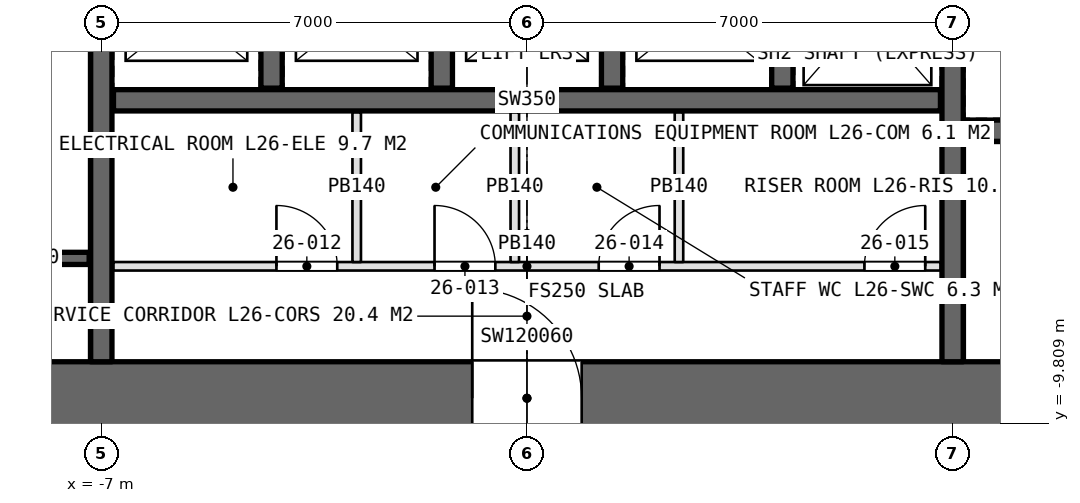
"""IFC4 building model, lengths in metres.
Left out: names, types, materials, properties, quantities, classifications, styles, units other than length and angle.
Written with IfcOpenShell. Run it as: python <this file> out.ifc"""

import sys

from ifc_helpers import new_model, si_unit, direction, frame, frame_2d, origin, place, context, subcontext, project, spatial, rectangle, extrude, element, fill, save


model = new_model("IFC4")
c1 = context("Model", 3, precision=1e-05, world=origin(), true_north=direction((0.0, 1.0)))
c2 = subcontext(c1, "Body", "Model", "MODEL_VIEW")
j1 = project(units=[si_unit("LENGTHUNIT", "METRE"), si_unit("PLANEANGLEUNIT", "RADIAN")], contexts=[c1])
p1 = place(None, origin())
s1 = spatial("IfcSite", under=j1, at=p1, CompositionType="ELEMENT")
p2 = place(p1, origin())
s2 = spatial("IfcBuilding", under=s1, at=p2, CompositionType="ELEMENT")
p3 = place(p2, frame((0.0, 0.0, 126.0)))
s3 = spatial("IfcBuildingStorey", under=s2, at=p3, CompositionType="ELEMENT", Elevation=126.0)
p4 = place(p3, frame((-14.0, -9.4, 0.0), z_axis=(0.0, 0.0, 1.0), x_axis=(1.0, 0.0, 0.0)))
e1 = element("IfcWall", 1, at=p4, inside=s3, PredefinedType="SHEAR", context=c2, shape_type="SweptSolid", body=[
    extrude(rectangle(XDim=28.0, YDim=1.2, at=frame_2d((14.0, 0.0))), origin(), (0.0, 0.0, 1.0), 4.2),
])
p5 = place(p4, frame((13.1, 0.0, 0.0)))
e2 = element("IfcOpeningElement", 2, at=p5, cuts=e1, PredefinedType="OPENING", context=c2, shape_type="SweptSolid", body=[
    extrude(rectangle(XDim=1.8, YDim=2.4, at=frame_2d((0.9, 1.2))), frame((0.0, 0.61, 0.0), z_axis=(0.0, -1.0, 0.0), x_axis=(1.0, 0.0, 0.0)), (0.0, 0.0, 1.0), 1.22),
])
p6 = place(p4, frame((22.9, 0.0, 0.0)))
e3 = element("IfcOpeningElement", 3, at=p6, cuts=e1, PredefinedType="OPENING", context=c2, shape_type="SweptSolid", body=[
    extrude(rectangle(XDim=2.2, YDim=2.7, at=frame_2d((1.1, 1.35))), frame((0.0, 0.61, 0.0), z_axis=(0.0, -1.0, 0.0), x_axis=(1.0, 0.0, 0.0)), (0.0, 0.0, 1.0), 1.22),
])
p7 = place(p3, frame((-7.0, -8.8, 0.0), z_axis=(0.0, 0.0, 1.0), x_axis=(0.0, 1.0, 0.0)))
e4 = element("IfcWall", 4, at=p7, inside=s3, PredefinedType="SHEAR", context=c2, shape_type="SweptSolid", body=[
    extrude(rectangle(XDim=17.6, YDim=0.35, at=frame_2d((8.8, 0.0))), origin(), (0.0, 0.0, 1.0), 4.2),
])
p8 = place(p7, frame((7.9, 0.0, 0.0)))
e5 = element("IfcOpeningElement", 5, at=p8, cuts=e4, PredefinedType="OPENING", context=c2, shape_type="SweptSolid", body=[
    extrude(rectangle(XDim=1.8, YDim=2.4, at=frame_2d((0.9, 1.2))), frame((0.0, 0.185, 0.0), z_axis=(0.0, -1.0, 0.0), x_axis=(1.0, 0.0, 0.0)), (0.0, 0.0, 1.0), 0.37),
])
p9 = place(p3, frame((7.0, -8.8, 0.0), z_axis=(0.0, 0.0, 1.0), x_axis=(0.0, 1.0, 0.0)))
e6 = element("IfcWall", 6, at=p9, inside=s3, PredefinedType="SHEAR", context=c2, shape_type="SweptSolid", body=[
    extrude(rectangle(XDim=17.6, YDim=0.35, at=frame_2d((8.8, 0.0))), origin(), (0.0, 0.0, 1.0), 4.2),
])
p10 = place(p9, frame((7.9, 0.0, 0.0)))
e7 = element("IfcOpeningElement", 7, at=p10, cuts=e6, PredefinedType="OPENING", context=c2, shape_type="SweptSolid", body=[
    extrude(rectangle(XDim=1.8, YDim=2.4, at=frame_2d((0.9, 1.2))), frame((0.0, 0.185, 0.0), z_axis=(0.0, -1.0, 0.0), x_axis=(1.0, 0.0, 0.0)), (0.0, 0.0, 1.0), 0.37),
])
p11 = place(p3, frame((-6.8, -4.5, 0.0), z_axis=(0.0, 0.0, 1.0), x_axis=(1.0, 0.0, 0.0)))
e8 = element("IfcWall", 8, at=p11, inside=s3, PredefinedType="SHEAR", context=c2, shape_type="SweptSolid", body=[
    extrude(rectangle(XDim=13.6, YDim=0.35, at=frame_2d((6.8, 0.0))), origin(), (0.0, 0.0, 1.0), 4.2),
])
p12 = place(p3, frame((7.2, -5.0, 0.0), z_axis=(0.0, 0.0, 1.0), x_axis=(1.0, 0.0, 0.0)))
e9 = element("IfcWall", 9, at=p12, inside=s3, PredefinedType="SHEAR", context=c2, shape_type="SweptSolid", body=[
    extrude(rectangle(XDim=5.6, YDim=0.35, at=frame_2d((2.8, 0.0))), origin(), (0.0, 0.0, 1.0), 4.2),
])
for number, where, z_axis, x_axis in (
    (10, (-4.2, -4.3, 0.0), (0.0, 0.0, 1.0), (0.0, 1.0, 0.0)),
    (11, (-1.4, -4.3, 0.0), (0.0, 0.0, 1.0), (0.0, 1.0, 0.0)),
    (12, (1.4, -4.3, 0.0), (0.0, 0.0, 1.0), (0.0, 1.0, 0.0)),
    (13, (4.2, -4.3, 0.0), (0.0, 0.0, 1.0), (0.0, 1.0, 0.0)),
):
    element("IfcWall", number, at=place(p3, frame(where, z_axis=z_axis, x_axis=x_axis)), inside=s3, PredefinedType="SHEAR", context=c2, shape_type="SweptSolid", body=[
        extrude(rectangle(XDim=2.5, YDim=0.35, at=frame_2d((1.25, 0.0))), origin(), (0.0, 0.0, 1.0), 4.2),
    ])
p13 = place(p3, frame((-6.8, -7.23, 0.0), z_axis=(0.0, 0.0, 1.0), x_axis=(1.0, 0.0, 0.0)))
e14 = element("IfcWall", 14, at=p13, inside=s3, PredefinedType="PARTITIONING", context=c2, shape_type="SweptSolid", body=[
    extrude(rectangle(XDim=13.6, YDim=0.14, at=frame_2d((6.8, 0.0))), origin(), (0.0, 0.0, 1.0), 3.95),
])
p14 = place(p13, frame((2.68, 0.0, 0.0)))
e15 = element("IfcOpeningElement", 15, at=p14, cuts=e14, PredefinedType="OPENING", context=c2, shape_type="SweptSolid", body=[
    extrude(rectangle(XDim=1.0, YDim=2.4, at=frame_2d((0.5, 1.2))), frame((0.0, 0.08, 0.0), z_axis=(0.0, -1.0, 0.0), x_axis=(1.0, 0.0, 0.0)), (0.0, 0.0, 1.0), 0.16),
])
p15 = place(p13, frame((5.28, 0.0, 0.0)))
e16 = element("IfcOpeningElement", 16, at=p15, cuts=e14, PredefinedType="OPENING", context=c2, shape_type="SweptSolid", body=[
    extrude(rectangle(XDim=1.0, YDim=2.4, at=frame_2d((0.5, 1.2))), frame((0.0, 0.08, 0.0), z_axis=(0.0, -1.0, 0.0), x_axis=(1.0, 0.0, 0.0)), (0.0, 0.0, 1.0), 0.16),
])
p16 = place(p13, frame((7.98, 0.0, 0.0)))
e17 = element("IfcOpeningElement", 17, at=p16, cuts=e14, PredefinedType="OPENING", context=c2, shape_type="SweptSolid", body=[
    extrude(rectangle(XDim=1.0, YDim=2.4, at=frame_2d((0.5, 1.2))), frame((0.0, 0.08, 0.0), z_axis=(0.0, -1.0, 0.0), x_axis=(1.0, 0.0, 0.0)), (0.0, 0.0, 1.0), 0.16),
])
p17 = place(p13, frame((12.35, 0.0, 0.0)))
e18 = element("IfcOpeningElement", 18, at=p17, cuts=e14, PredefinedType="OPENING", context=c2, shape_type="SweptSolid", body=[
    extrude(rectangle(XDim=1.0, YDim=2.4, at=frame_2d((0.5, 1.2))), frame((0.0, 0.08, 0.0), z_axis=(0.0, -1.0, 0.0), x_axis=(1.0, 0.0, 0.0)), (0.0, 0.0, 1.0), 0.16),
])
for number, where, z_axis, x_axis in (
    (19, (-2.8, -4.7, 0.0), (0.0, 0.0, 1.0), (0.0, -1.0, 0.0)),
    (20, (-0.2, -4.7, 0.0), (0.0, 0.0, 1.0), (0.0, -1.0, 0.0)),
    (21, (2.5, -4.7, 0.0), (0.0, 0.0, 1.0), (0.0, -1.0, 0.0)),
):
    element("IfcWall", number, at=place(p3, frame(where, z_axis=z_axis, x_axis=x_axis)), inside=s3, PredefinedType="PARTITIONING", context=c2, shape_type="SweptSolid", body=[
        extrude(rectangle(XDim=2.46, YDim=0.14, at=frame_2d((1.23, 0.0))), origin(), (0.0, 0.0, 1.0), 3.95),
    ])
p18 = place(p3, frame((-9.15, -7.1, 0.0), z_axis=(0.0, 0.0, 1.0), x_axis=(1.0, 0.0, 0.0)))
e22 = element("IfcWall", 22, at=p18, inside=s3, PredefinedType="SOLIDWALL", context=c2, shape_type="SweptSolid", body=[
    extrude(rectangle(XDim=1.95, YDim=0.2, at=frame_2d((0.975, 0.0))), origin(), (0.0, 0.0, 1.0), 4.2),
])
p19 = place(p14, origin())
e23 = element("IfcDoor", 23, at=p19, inside=s3, OperationType="SINGLE_SWING_LEFT", PredefinedType="DOOR", context=c2, shape_type="SweptSolid", body=[
    extrude(rectangle(XDim=1.0, YDim=2.4, at=frame_2d((0.5, 1.2))), frame((0.0, 0.025, 0.0), z_axis=(0.0, -1.0, 0.0), x_axis=(1.0, 0.0, 0.0)), (0.0, 0.0, 1.0), 0.05),
])
fill(e15, e23)
p20 = place(p15, origin())
e24 = element("IfcDoor", 24, at=p20, inside=s3, OperationType="SINGLE_SWING_LEFT", PredefinedType="DOOR", context=c2, shape_type="SweptSolid", body=[
    extrude(rectangle(XDim=1.0, YDim=2.4, at=frame_2d((0.5, 1.2))), frame((0.0, 0.025, 0.0), z_axis=(0.0, -1.0, 0.0), x_axis=(1.0, 0.0, 0.0)), (0.0, 0.0, 1.0), 0.05),
])
fill(e16, e24)
p21 = place(p16, origin())
e25 = element("IfcDoor", 25, at=p21, inside=s3, OperationType="SINGLE_SWING_RIGHT", PredefinedType="DOOR", context=c2, shape_type="SweptSolid", body=[
    extrude(rectangle(XDim=1.0, YDim=2.4, at=frame_2d((0.5, 1.2))), frame((0.0, 0.025, 0.0), z_axis=(0.0, -1.0, 0.0), x_axis=(1.0, 0.0, 0.0)), (0.0, 0.0, 1.0), 0.05),
])
fill(e17, e25)
p22 = place(p17, origin())
e26 = element("IfcDoor", 26, at=p22, inside=s3, OperationType="SINGLE_SWING_RIGHT", PredefinedType="DOOR", context=c2, shape_type="SweptSolid", body=[
    extrude(rectangle(XDim=1.0, YDim=2.4, at=frame_2d((0.5, 1.2))), frame((0.0, 0.025, 0.0), z_axis=(0.0, -1.0, 0.0), x_axis=(1.0, 0.0, 0.0)), (0.0, 0.0, 1.0), 0.05),
])
fill(e18, e26)
p23 = place(p5, origin())
e27 = element("IfcDoor", 27, at=p23, inside=s3, OperationType="DOUBLE_DOOR_SINGLE_SWING", PredefinedType="DOOR", context=c2, shape_type="SweptSolid", body=[
    extrude(rectangle(XDim=1.8, YDim=2.4, at=frame_2d((0.9, 1.2))), frame((0.0, 0.025, 0.0), z_axis=(0.0, -1.0, 0.0), x_axis=(1.0, 0.0, 0.0)), (0.0, 0.0, 1.0), 0.05),
])
fill(e2, e27)
save(model, sys.argv[1])
